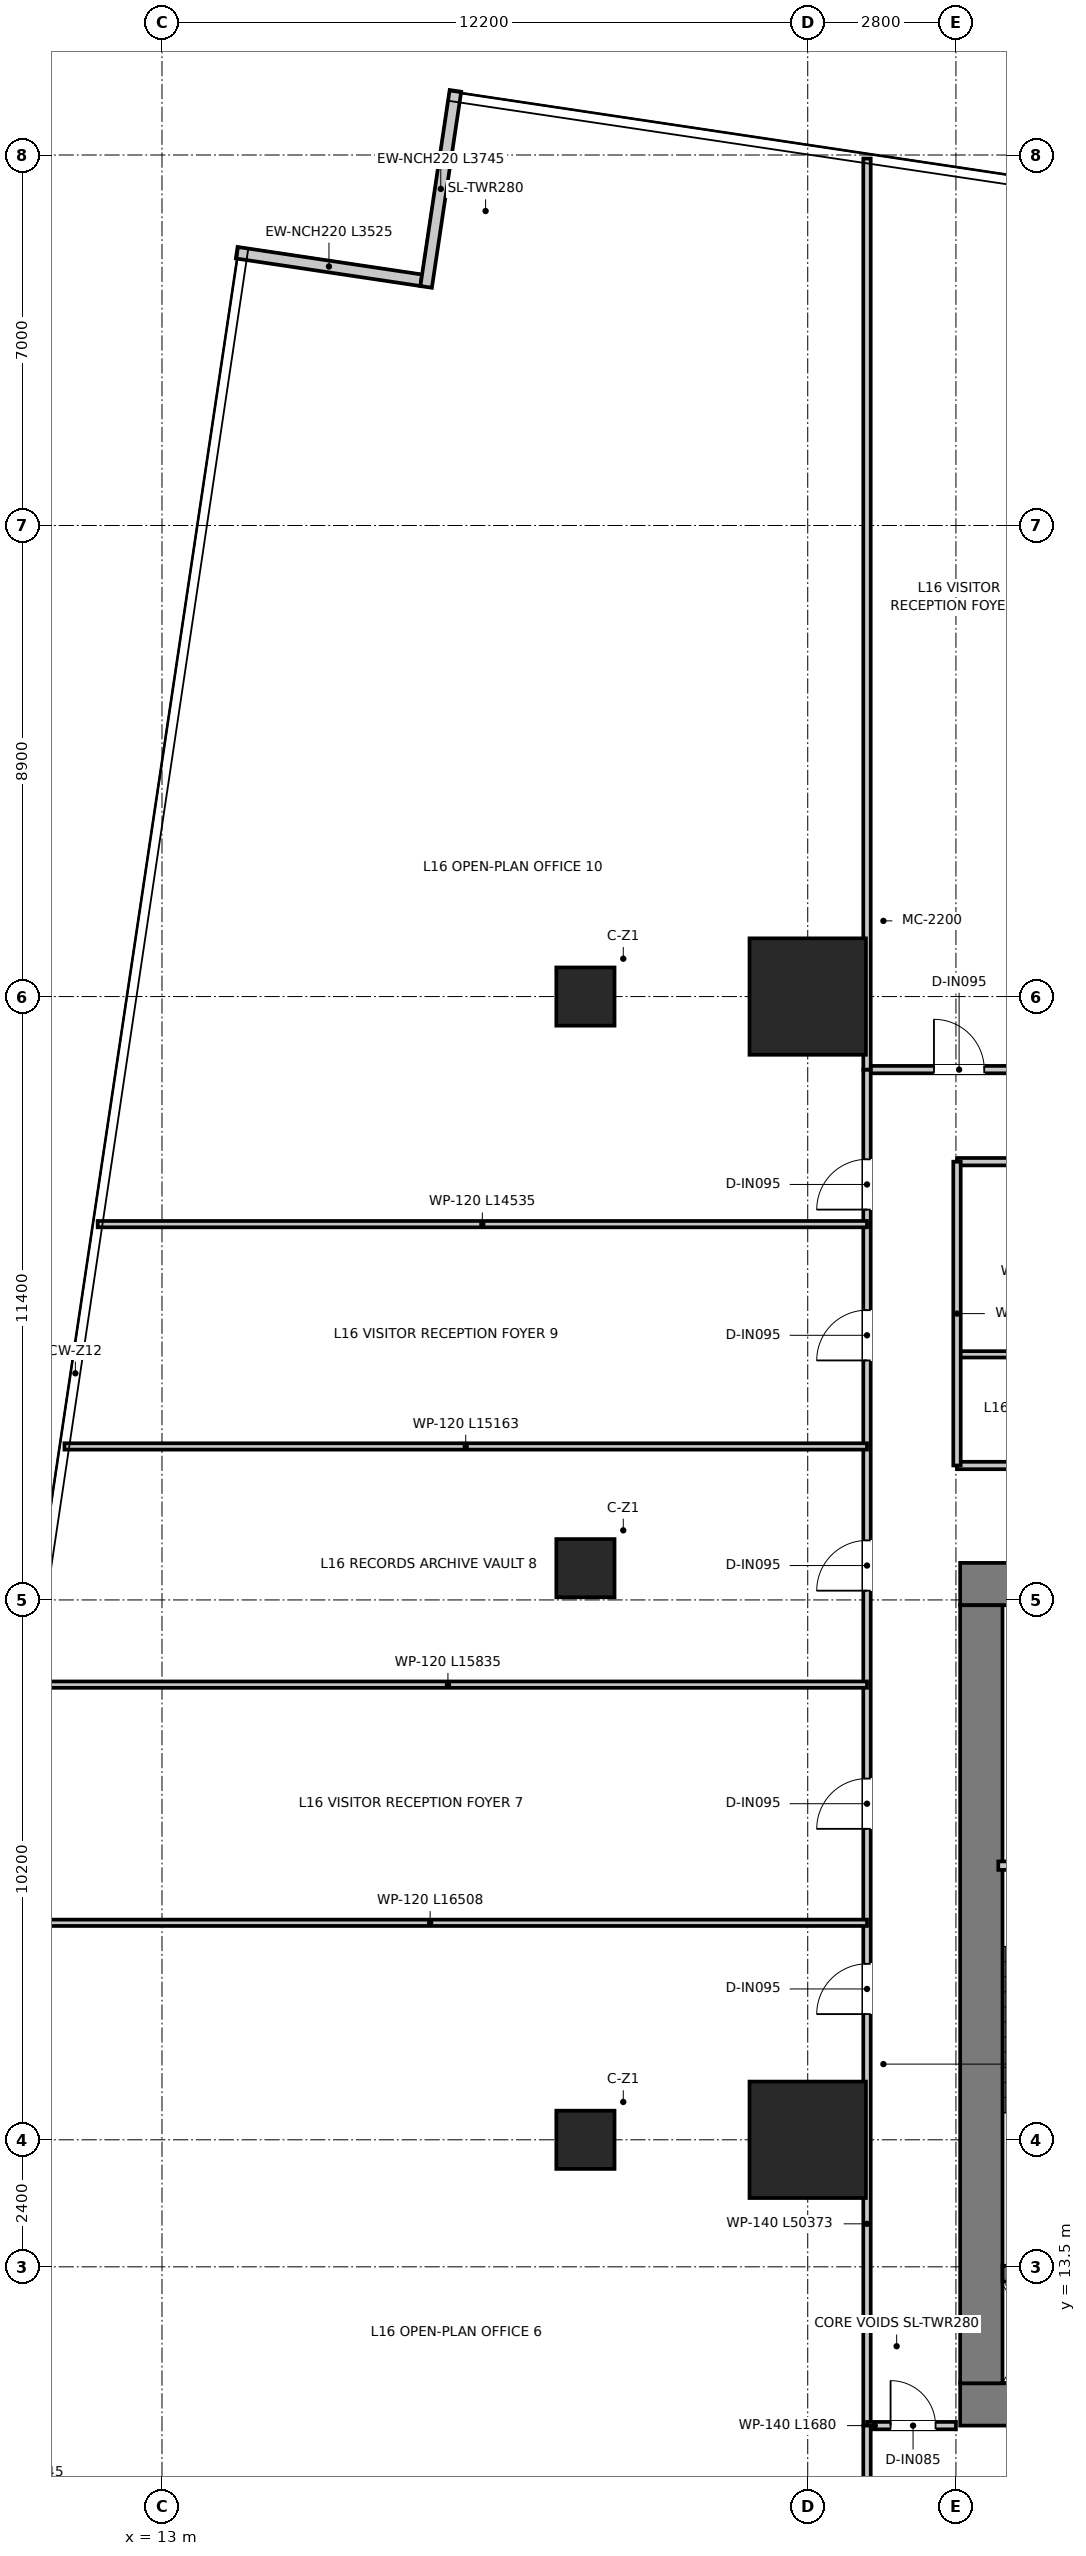
"""IFC4 building model, lengths in metres.
Left out: names, types, materials, properties, quantities, classifications, styles, units other than length and angle.
Written with IfcOpenShell. Run it as: python <this file> out.ifc"""

import sys

from ifc_helpers import new_model, si_unit, direction, frame, frame_2d, origin, origin_2d, place, context, subcontext, project, spatial, rectangle, extrude, source, transform, mapped, element, fill, save


model = new_model("IFC4")
c1 = context("Model", 3, precision=1e-05, world=origin(), true_north=direction((0.0, 1.0)))
c2 = subcontext(c1, "Body", "Model", "MODEL_VIEW")
j1 = project(units=[si_unit("LENGTHUNIT", "METRE"), si_unit("PLANEANGLEUNIT", "RADIAN")], contexts=[c1])
p1 = place(None, origin())
s1 = spatial("IfcSite", under=j1, at=p1, CompositionType="ELEMENT")
p2 = place(p1, origin())
s2 = spatial("IfcBuilding", under=s1, at=p2, CompositionType="ELEMENT")
p3 = place(p2, frame((0.0, 0.0, 68.45)))
s3 = spatial("IfcBuildingStorey", under=s2, at=p3, CompositionType="ELEMENT", Elevation=68.45)
p4 = place(p3, frame((28.08, 10.9, 0.0), z_axis=(0.0, 0.0, 1.0), x_axis=(1.0, 0.0, 0.0)))
e1 = element("IfcWall", 1, at=p4, inside=s3, PredefinedType="SHEAR", context=c2, shape_type="SweptSolid", body=[
    extrude(rectangle(XDim=15.84, YDim=0.8, at=frame_2d((7.92, 0.0))), origin(), (0.0, 0.0, 1.0), 3.95),
])
p5 = place(p3, frame((28.08, 26.4, 0.0), z_axis=(0.0, 0.0, 1.0), x_axis=(1.0, 0.0, 0.0)))
e2 = element("IfcWall", 2, at=p5, inside=s3, PredefinedType="SHEAR", context=c2, shape_type="SweptSolid", body=[
    extrude(rectangle(XDim=15.84, YDim=0.8, at=frame_2d((7.92, 0.0))), origin(), (0.0, 0.0, 1.0), 3.95),
])
p6 = place(p5, frame((7.22, 0.0, 0.0)))
e3 = element("IfcOpeningElement", 3, at=p6, cuts=e2, PredefinedType="OPENING", context=c2, shape_type="SweptSolid", body=[
    extrude(rectangle(XDim=1.4, YDim=2.2, at=frame_2d((0.7, 1.1))), frame((0.0, 0.41, 0.0), z_axis=(0.0, -1.0, 0.0), x_axis=(1.0, 0.0, 0.0)), (0.0, 0.0, 1.0), 0.82),
])
p7 = place(p5, frame((1.775, 0.0, 0.0)))
e4 = element("IfcOpeningElement", 4, at=p7, cuts=e2, PredefinedType="OPENING", context=c2, shape_type="SweptSolid", body=[
    extrude(rectangle(XDim=1.05, YDim=2.1, at=frame_2d((0.525, 1.05))), frame((0.0, 0.41, 0.0), z_axis=(0.0, -1.0, 0.0), x_axis=(1.0, 0.0, 0.0)), (0.0, 0.0, 1.0), 0.82),
])
p8 = place(p5, frame((13.015, 0.0, 0.0)))
e5 = element("IfcOpeningElement", 5, at=p8, cuts=e2, PredefinedType="OPENING", context=c2, shape_type="SweptSolid", body=[
    extrude(rectangle(XDim=1.05, YDim=2.1, at=frame_2d((0.525, 1.05))), frame((0.0, 0.41, 0.0), z_axis=(0.0, -1.0, 0.0), x_axis=(1.0, 0.0, 0.0)), (0.0, 0.0, 1.0), 0.82),
])
p9 = place(p3, frame((28.48, 11.3, 0.0), z_axis=(0.0, 0.0, 1.0), x_axis=(0.0, 1.0, 0.0)))
e6 = element("IfcWall", 6, at=p9, inside=s3, PredefinedType="SHEAR", context=c2, shape_type="SweptSolid", body=[
    extrude(rectangle(XDim=14.7, YDim=0.8, at=frame_2d((7.35, 0.0))), origin(), (0.0, 0.0, 1.0), 3.95),
])
p10 = place(p3, frame((28.88, 13.37, 0.0), z_axis=(0.0, 0.0, 1.0), x_axis=(1.0, 0.0, 0.0)))
e7 = element("IfcWall", 7, at=p10, inside=s3, PredefinedType="SHEAR", context=c2, shape_type="SweptSolid", body=[
    extrude(rectangle(XDim=3.1, YDim=0.3, at=frame_2d((1.55, 0.0))), origin(), (0.0, 0.0, 1.0), 3.95),
])
m1 = source(origin(), c2, "Body", "SweptSolid", [
    extrude(rectangle(XDim=2.2, YDim=2.2, at=origin_2d()), origin(), (0.0, 0.0, 1.0), 3.95),
])
for number, where, z_axis, x_axis in (
    (8, (25.2, 15.9, 0.0), (0.0, 0.0, 1.0), (1.0, 0.0, 0.0)),
    (9, (25.2, 37.5, 0.0), (0.0, 0.0, 1.0), (1.0, 0.0, 0.0)),
):
    element("IfcColumn", number, at=place(p3, frame(where, z_axis=z_axis, x_axis=x_axis)), inside=s3, PredefinedType="USERDEFINED", context=c2, shape_type="MappedRepresentation", body=[
        mapped(m1, transform((0.0, 0.0, 0.0), x_axis=(1.0, 0.0, 0.0), y_axis=(0.0, 1.0, 0.0), z_axis=(0.0, 0.0, 1.0), scale=1.0)),
    ])
m2 = source(origin(), c2, "Body", "SweptSolid", [
    extrude(rectangle(XDim=1.1, YDim=1.1, at=origin_2d()), origin(), (0.0, 0.0, 1.0), 3.95),
])
for number, where, z_axis, x_axis in (
    (10, (21.0, 15.9, 0.0), (0.0, 0.0, 1.0), (1.0, 0.0, 0.0)),
    (11, (21.0, 26.7, 0.0), (0.0, 0.0, 1.0), (1.0, 0.0, 0.0)),
    (12, (21.0, 37.5, 0.0), (0.0, 0.0, 1.0), (1.0, 0.0, 0.0)),
):
    element("IfcColumn", number, at=place(p3, frame(where, z_axis=z_axis, x_axis=x_axis)), inside=s3, PredefinedType="COLUMN", context=c2, shape_type="MappedRepresentation", body=[
        mapped(m2, transform((0.0, 0.0, 0.0), x_axis=(1.0, 0.0, 0.0), y_axis=(0.0, 1.0, 0.0), z_axis=(0.0, 0.0, 1.0), scale=1.0)),
    ])
p11 = place(p3, frame((17.898, 51.033, 0.0), z_axis=(0.0, 0.0, 1.0), x_axis=(-0.989015973204, 0.147808676155, 0.0)))
e13 = element("IfcWall", 13, at=p11, inside=s3, PredefinedType="ELEMENTEDWALL", context=c2, shape_type="SweptSolid", body=[
    extrude(rectangle(XDim=3.525, YDim=0.22, at=frame_2d((1.762, 0.0))), origin(), (0.0, 0.0, 1.0), 3.67),
])
p12 = place(p3, frame((18.544, 54.612, 0.0), z_axis=(0.0, 0.0, 1.0), x_axis=(-0.147852699435, -0.989009392913, 0.0)))
e14 = element("IfcWall", 14, at=p12, inside=s3, PredefinedType="ELEMENTEDWALL", context=c2, shape_type="SweptSolid", body=[
    extrude(rectangle(XDim=3.745, YDim=0.22, at=frame_2d((1.873, 0.0))), origin(), (0.0, 0.0, 1.0), 3.67),
])
p13 = place(p3, frame((28.8, 21.08, 0.0), z_axis=(0.0, 0.0, 1.0), x_axis=(1.0, 0.0, 0.0)))
e15 = element("IfcWall", 15, at=p13, inside=s3, PredefinedType="PARTITIONING", context=c2, shape_type="SweptSolid", body=[
    extrude(rectangle(XDim=3.16, YDim=0.16, at=frame_2d((1.58, 0.0))), origin(), (0.0, 0.0, 1.0), 3.67),
])
p14 = place(p13, frame((1.055, 0.0, 0.0)))
e16 = element("IfcOpeningElement", 16, at=p14, cuts=e15, PredefinedType="OPENING", context=c2, shape_type="SweptSolid", body=[
    extrude(rectangle(XDim=1.05, YDim=2.1, at=frame_2d((0.525, 1.05))), frame((0.0, 0.09, 0.0), z_axis=(0.0, -1.0, 0.0), x_axis=(1.0, 0.0, 0.0)), (0.0, 0.0, 1.0), 0.18),
])
p15 = place(p3, frame((28.02, 28.64, 0.0), z_axis=(0.0, 0.0, 1.0), x_axis=(1.0, 0.0, 0.0)))
e17 = element("IfcWall", 17, at=p15, inside=s3, PredefinedType="PARTITIONING", context=c2, shape_type="SweptSolid", body=[
    extrude(rectangle(XDim=15.96, YDim=0.14, at=frame_2d((7.98, 0.0))), origin(), (0.0, 0.0, 1.0), 3.08),
])
p16 = place(p15, frame((7.455, 0.0, 0.0)))
e18 = element("IfcOpeningElement", 18, at=p16, cuts=e17, PredefinedType="OPENING", context=c2, shape_type="SweptSolid", body=[
    extrude(rectangle(XDim=1.05, YDim=2.15, at=frame_2d((0.525, 1.075))), frame((0.0, 0.08, 0.0), z_axis=(0.0, -1.0, 0.0), x_axis=(1.0, 0.0, 0.0)), (0.0, 0.0, 1.0), 0.16),
])
p17 = place(p3, frame((28.02, 30.74, 0.0), z_axis=(0.0, 0.0, 1.0), x_axis=(1.0, 0.0, 0.0)))
e19 = element("IfcWall", 19, at=p17, inside=s3, PredefinedType="PARTITIONING", context=c2, shape_type="SweptSolid", body=[
    extrude(rectangle(XDim=15.96, YDim=0.12, at=frame_2d((7.98, 0.0))), origin(), (0.0, 0.0, 1.0), 3.08),
])
p18 = place(p3, frame((28.02, 34.38, 0.0), z_axis=(0.0, 0.0, 1.0), x_axis=(1.0, 0.0, 0.0)))
e20 = element("IfcWall", 20, at=p18, inside=s3, PredefinedType="PARTITIONING", context=c2, shape_type="SweptSolid", body=[
    extrude(rectangle(XDim=15.96, YDim=0.14, at=frame_2d((7.98, 0.0))), origin(), (0.0, 0.0, 1.0), 3.08),
])
p19 = place(p18, frame((1.13, 0.0, 0.0)))
e21 = element("IfcOpeningElement", 21, at=p19, cuts=e20, PredefinedType="OPENING", context=c2, shape_type="SweptSolid", body=[
    extrude(rectangle(XDim=0.9, YDim=2.1, at=frame_2d((0.45, 1.05))), frame((0.0, 0.08, 0.0), z_axis=(0.0, -1.0, 0.0), x_axis=(1.0, 0.0, 0.0)), (0.0, 0.0, 1.0), 0.16),
])
p20 = place(p18, frame((4.33, 0.0, 0.0)))
e22 = element("IfcOpeningElement", 22, at=p20, cuts=e20, PredefinedType="OPENING", context=c2, shape_type="SweptSolid", body=[
    extrude(rectangle(XDim=0.9, YDim=2.1, at=frame_2d((0.45, 1.05))), frame((0.0, 0.08, 0.0), z_axis=(0.0, -1.0, 0.0), x_axis=(1.0, 0.0, 0.0)), (0.0, 0.0, 1.0), 0.16),
])
p21 = place(p18, frame((7.355, 0.0, 0.0)))
e23 = element("IfcOpeningElement", 23, at=p21, cuts=e20, PredefinedType="OPENING", context=c2, shape_type="SweptSolid", body=[
    extrude(rectangle(XDim=0.95, YDim=2.1, at=frame_2d((0.475, 1.05))), frame((0.0, 0.08, 0.0), z_axis=(0.0, -1.0, 0.0), x_axis=(1.0, 0.0, 0.0)), (0.0, 0.0, 1.0), 0.16),
])
p22 = place(p18, frame((12.23, 0.0, 0.0)))
e24 = element("IfcOpeningElement", 24, at=p22, cuts=e20, PredefinedType="OPENING", context=c2, shape_type="SweptSolid", body=[
    extrude(rectangle(XDim=0.95, YDim=2.1, at=frame_2d((0.475, 1.05))), frame((0.0, 0.08, 0.0), z_axis=(0.0, -1.0, 0.0), x_axis=(1.0, 0.0, 0.0)), (0.0, 0.0, 1.0), 0.16),
])
p23 = place(p3, frame((28.02, 28.64, 0.0), z_axis=(0.0, 0.0, 1.0), x_axis=(0.0, 1.0, 0.0)))
e25 = element("IfcWall", 25, at=p23, inside=s3, PredefinedType="PARTITIONING", context=c2, shape_type="SweptSolid", body=[
    extrude(rectangle(XDim=5.74, YDim=0.14, at=frame_2d((2.87, 0.0))), origin(), (0.0, 0.0, 1.0), 3.22),
])
p24 = place(p3, frame((26.32, 36.12, 0.0), z_axis=(0.0, 0.0, 1.0), x_axis=(1.0, 0.0, 0.0)))
e26 = element("IfcWall", 26, at=p24, inside=s3, PredefinedType="PARTITIONING", context=c2, shape_type="SweptSolid", body=[
    extrude(rectangle(XDim=19.36, YDim=0.14, at=frame_2d((9.68, 0.0))), origin(), (0.0, 0.0, 1.0), 3.08),
])
p25 = place(p24, frame((1.265, 0.0, 0.0)))
e27 = element("IfcOpeningElement", 27, at=p25, cuts=e26, PredefinedType="OPENING", context=c2, shape_type="SweptSolid", body=[
    extrude(rectangle(XDim=0.95, YDim=2.1, at=frame_2d((0.475, 1.05))), frame((0.0, 0.08, 0.0), z_axis=(0.0, -1.0, 0.0), x_axis=(1.0, 0.0, 0.0)), (0.0, 0.0, 1.0), 0.16),
])
p26 = place(p24, frame((5.305, 0.0, 0.0)))
e28 = element("IfcOpeningElement", 28, at=p26, cuts=e26, PredefinedType="OPENING", context=c2, shape_type="SweptSolid", body=[
    extrude(rectangle(XDim=0.95, YDim=2.1, at=frame_2d((0.475, 1.05))), frame((0.0, 0.08, 0.0), z_axis=(0.0, -1.0, 0.0), x_axis=(1.0, 0.0, 0.0)), (0.0, 0.0, 1.0), 0.16),
])
p27 = place(p24, frame((9.905, 0.0, 0.0)))
e29 = element("IfcOpeningElement", 29, at=p27, cuts=e26, PredefinedType="OPENING", context=c2, shape_type="SweptSolid", body=[
    extrude(rectangle(XDim=0.95, YDim=2.1, at=frame_2d((0.475, 1.05))), frame((0.0, 0.08, 0.0), z_axis=(0.0, -1.0, 0.0), x_axis=(1.0, 0.0, 0.0)), (0.0, 0.0, 1.0), 0.16),
])
p28 = place(p24, frame((14.305, 0.0, 0.0)))
e30 = element("IfcOpeningElement", 30, at=p28, cuts=e26, PredefinedType="OPENING", context=c2, shape_type="SweptSolid", body=[
    extrude(rectangle(XDim=0.95, YDim=2.1, at=frame_2d((0.475, 1.05))), frame((0.0, 0.08, 0.0), z_axis=(0.0, -1.0, 0.0), x_axis=(1.0, 0.0, 0.0)), (0.0, 0.0, 1.0), 0.16),
])
p29 = place(p24, frame((17.645, 0.0, 0.0)))
e31 = element("IfcOpeningElement", 31, at=p29, cuts=e26, PredefinedType="OPENING", context=c2, shape_type="SweptSolid", body=[
    extrude(rectangle(XDim=0.95, YDim=2.1, at=frame_2d((0.475, 1.05))), frame((0.0, 0.08, 0.0), z_axis=(0.0, -1.0, 0.0), x_axis=(1.0, 0.0, 0.0)), (0.0, 0.0, 1.0), 0.16),
])
p30 = place(p3, frame((26.32, 10.5, 0.0), z_axis=(0.0, 0.0, 1.0), x_axis=(0.0, 1.0, 0.0)))
e32 = element("IfcWall", 32, at=p30, inside=s3, PredefinedType="PARTITIONING", context=c2, shape_type="SweptSolid", body=[
    extrude(rectangle(XDim=25.62, YDim=0.14, at=frame_2d((12.81, 0.0))), origin(), (0.0, 0.0, 1.0), 2.97),
])
p31 = place(p30, frame((7.775, 0.0, 0.0)))
e33 = element("IfcOpeningElement", 33, at=p31, cuts=e32, PredefinedType="OPENING", context=c2, shape_type="SweptSolid", body=[
    extrude(rectangle(XDim=0.95, YDim=2.1, at=frame_2d((0.475, 1.05))), frame((0.0, 0.08, 0.0), z_axis=(0.0, -1.0, 0.0), x_axis=(1.0, 0.0, 0.0)), (0.0, 0.0, 1.0), 0.16),
])
p32 = place(p30, frame((11.275, 0.0, 0.0)))
e34 = element("IfcOpeningElement", 34, at=p32, cuts=e32, PredefinedType="OPENING", context=c2, shape_type="SweptSolid", body=[
    extrude(rectangle(XDim=0.95, YDim=2.1, at=frame_2d((0.475, 1.05))), frame((0.0, 0.08, 0.0), z_axis=(0.0, -1.0, 0.0), x_axis=(1.0, 0.0, 0.0)), (0.0, 0.0, 1.0), 0.16),
])
p33 = place(p30, frame((15.775, 0.0, 0.0)))
e35 = element("IfcOpeningElement", 35, at=p33, cuts=e32, PredefinedType="OPENING", context=c2, shape_type="SweptSolid", body=[
    extrude(rectangle(XDim=0.95, YDim=2.1, at=frame_2d((0.475, 1.05))), frame((0.0, 0.08, 0.0), z_axis=(0.0, -1.0, 0.0), x_axis=(1.0, 0.0, 0.0)), (0.0, 0.0, 1.0), 0.16),
])
p34 = place(p30, frame((20.125, 0.0, 0.0)))
e36 = element("IfcOpeningElement", 36, at=p34, cuts=e32, PredefinedType="OPENING", context=c2, shape_type="SweptSolid", body=[
    extrude(rectangle(XDim=0.95, YDim=2.1, at=frame_2d((0.475, 1.05))), frame((0.0, 0.08, 0.0), z_axis=(0.0, -1.0, 0.0), x_axis=(1.0, 0.0, 0.0)), (0.0, 0.0, 1.0), 0.16),
])
p35 = place(p30, frame((22.975, 0.0, 0.0)))
e37 = element("IfcOpeningElement", 37, at=p35, cuts=e32, PredefinedType="OPENING", context=c2, shape_type="SweptSolid", body=[
    extrude(rectangle(XDim=0.95, YDim=2.1, at=frame_2d((0.475, 1.05))), frame((0.0, 0.08, 0.0), z_axis=(0.0, -1.0, 0.0), x_axis=(1.0, 0.0, 0.0)), (0.0, 0.0, 1.0), 0.16),
])
p36 = place(p3, frame((26.32, 10.5, 0.0), z_axis=(0.0, 0.0, 1.0), x_axis=(1.0, 0.0, 0.0)))
e38 = element("IfcWall", 38, at=p36, inside=s3, PredefinedType="PARTITIONING", context=c2, shape_type="SweptSolid", body=[
    extrude(rectangle(XDim=1.68, YDim=0.14, at=frame_2d((0.84, 0.0))), origin(), (0.0, 0.0, 1.0), 3.67),
])
p37 = place(p36, frame((0.445, 0.0, 0.0)))
e39 = element("IfcOpeningElement", 39, at=p37, cuts=e38, PredefinedType="OPENING", context=c2, shape_type="SweptSolid", body=[
    extrude(rectangle(XDim=0.85, YDim=2.1, at=frame_2d((0.425, 1.05))), frame((0.0, 0.08, 0.0), z_axis=(0.0, -1.0, 0.0), x_axis=(1.0, 0.0, 0.0)), (0.0, 0.0, 1.0), 0.16),
])
p38 = place(p3, frame((26.32, 36.12, 0.0), z_axis=(0.0, 0.0, 1.0), x_axis=(0.0, 1.0, 0.0)))
e40 = element("IfcWall", 40, at=p38, inside=s3, PredefinedType="PARTITIONING", context=c2, shape_type="SweptSolid", body=[
    extrude(rectangle(XDim=17.213, YDim=0.14, at=frame_2d((8.606, 0.0))), origin(), (0.0, 0.0, 1.0), 2.97),
])
p39 = place(p3, frame((26.32, 2.96, 0.0), z_axis=(0.0, 0.0, 1.0), x_axis=(0.0, 1.0, 0.0)))
e41 = element("IfcWall", 41, at=p39, inside=s3, PredefinedType="PARTITIONING", context=c2, shape_type="SweptSolid", body=[
    extrude(rectangle(XDim=7.54, YDim=0.14, at=frame_2d((3.77, 0.0))), origin(), (0.0, 0.0, 1.0), 3.67),
])
p40 = place(p3, frame((9.812, 20.0, 0.0), z_axis=(0.0, 0.0, 1.0), x_axis=(1.0, 0.0, 0.0)))
e42 = element("IfcWall", 42, at=p40, inside=s3, PredefinedType="PARTITIONING", context=c2, shape_type="SweptSolid", body=[
    extrude(rectangle(XDim=16.508, YDim=0.12, at=frame_2d((8.254, 0.0))), origin(), (0.0, 0.0, 1.0), 2.97),
])
p41 = place(p3, frame((10.485, 24.5, 0.0), z_axis=(0.0, 0.0, 1.0), x_axis=(1.0, 0.0, 0.0)))
e43 = element("IfcWall", 43, at=p41, inside=s3, PredefinedType="PARTITIONING", context=c2, shape_type="SweptSolid", body=[
    extrude(rectangle(XDim=15.835, YDim=0.12, at=frame_2d((7.918, 0.0))), origin(), (0.0, 0.0, 1.0), 2.97),
])
p42 = place(p3, frame((11.157, 29.0, 0.0), z_axis=(0.0, 0.0, 1.0), x_axis=(1.0, 0.0, 0.0)))
e44 = element("IfcWall", 44, at=p42, inside=s3, PredefinedType="PARTITIONING", context=c2, shape_type="SweptSolid", body=[
    extrude(rectangle(XDim=15.163, YDim=0.12, at=frame_2d((7.582, 0.0))), origin(), (0.0, 0.0, 1.0), 2.97),
])
p43 = place(p3, frame((11.785, 33.2, 0.0), z_axis=(0.0, 0.0, 1.0), x_axis=(1.0, 0.0, 0.0)))
e45 = element("IfcWall", 45, at=p43, inside=s3, PredefinedType="PARTITIONING", context=c2, shape_type="SweptSolid", body=[
    extrude(rectangle(XDim=14.535, YDim=0.12, at=frame_2d((7.268, 0.0))), origin(), (0.0, 0.0, 1.0), 2.97),
])
p44 = place(p25, origin())
e46 = element("IfcDoor", 46, at=p44, inside=s3, OperationType="SINGLE_SWING_LEFT", PredefinedType="DOOR", context=c2, shape_type="SweptSolid", body=[
    extrude(rectangle(XDim=0.95, YDim=2.1, at=frame_2d((0.475, 1.05))), frame((0.0, 0.025, 0.0), z_axis=(0.0, -1.0, 0.0), x_axis=(1.0, 0.0, 0.0)), (0.0, 0.0, 1.0), 0.05),
])
fill(e27, e46)
p45 = place(p31, origin())
e47 = element("IfcDoor", 47, at=p45, inside=s3, OperationType="SINGLE_SWING_LEFT", PredefinedType="DOOR", context=c2, shape_type="SweptSolid", body=[
    extrude(rectangle(XDim=0.95, YDim=2.1, at=frame_2d((0.475, 1.05))), frame((0.0, 0.025, 0.0), z_axis=(0.0, -1.0, 0.0), x_axis=(1.0, 0.0, 0.0)), (0.0, 0.0, 1.0), 0.05),
])
fill(e33, e47)
p46 = place(p32, origin())
e48 = element("IfcDoor", 48, at=p46, inside=s3, OperationType="SINGLE_SWING_LEFT", PredefinedType="DOOR", context=c2, shape_type="SweptSolid", body=[
    extrude(rectangle(XDim=0.95, YDim=2.1, at=frame_2d((0.475, 1.05))), frame((0.0, 0.025, 0.0), z_axis=(0.0, -1.0, 0.0), x_axis=(1.0, 0.0, 0.0)), (0.0, 0.0, 1.0), 0.05),
])
fill(e34, e48)
p47 = place(p33, origin())
e49 = element("IfcDoor", 49, at=p47, inside=s3, OperationType="SINGLE_SWING_LEFT", PredefinedType="DOOR", context=c2, shape_type="SweptSolid", body=[
    extrude(rectangle(XDim=0.95, YDim=2.1, at=frame_2d((0.475, 1.05))), frame((0.0, 0.025, 0.0), z_axis=(0.0, -1.0, 0.0), x_axis=(1.0, 0.0, 0.0)), (0.0, 0.0, 1.0), 0.05),
])
fill(e35, e49)
p48 = place(p34, origin())
e50 = element("IfcDoor", 50, at=p48, inside=s3, OperationType="SINGLE_SWING_LEFT", PredefinedType="DOOR", context=c2, shape_type="SweptSolid", body=[
    extrude(rectangle(XDim=0.95, YDim=2.1, at=frame_2d((0.475, 1.05))), frame((0.0, 0.025, 0.0), z_axis=(0.0, -1.0, 0.0), x_axis=(1.0, 0.0, 0.0)), (0.0, 0.0, 1.0), 0.05),
])
fill(e36, e50)
p49 = place(p35, origin())
e51 = element("IfcDoor", 51, at=p49, inside=s3, OperationType="SINGLE_SWING_LEFT", PredefinedType="DOOR", context=c2, shape_type="SweptSolid", body=[
    extrude(rectangle(XDim=0.95, YDim=2.1, at=frame_2d((0.475, 1.05))), frame((0.0, 0.025, 0.0), z_axis=(0.0, -1.0, 0.0), x_axis=(1.0, 0.0, 0.0)), (0.0, 0.0, 1.0), 0.05),
])
fill(e37, e51)
p50 = place(p37, origin())
e52 = element("IfcDoor", 52, at=p50, inside=s3, OperationType="SINGLE_SWING_LEFT", PredefinedType="DOOR", context=c2, shape_type="SweptSolid", body=[
    extrude(rectangle(XDim=0.85, YDim=2.1, at=frame_2d((0.425, 1.05))), frame((0.0, 0.025, 0.0), z_axis=(0.0, -1.0, 0.0), x_axis=(1.0, 0.0, 0.0)), (0.0, 0.0, 1.0), 0.05),
])
fill(e39, e52)
save(model, sys.argv[1])
